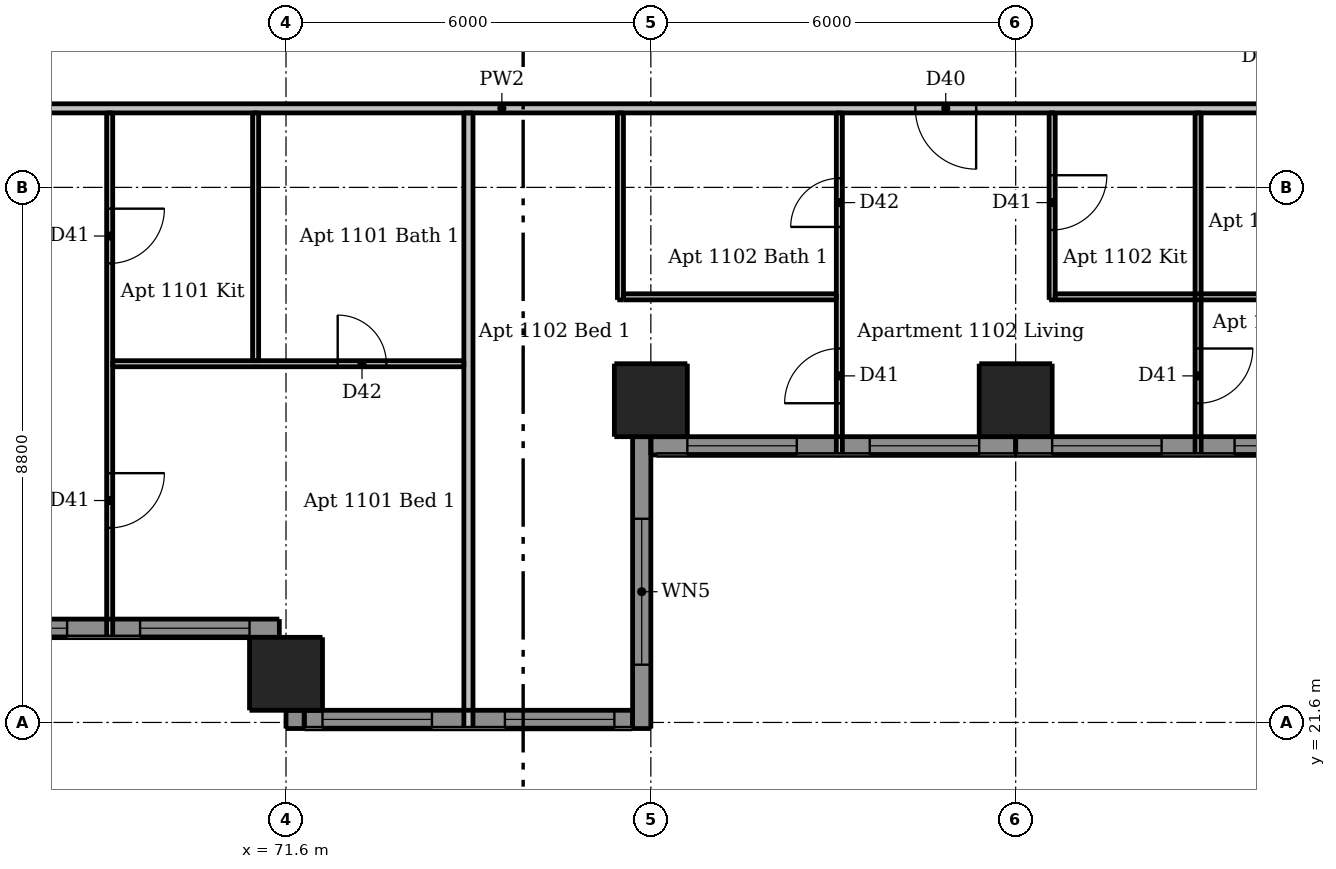
"""IFC4 building model, lengths in metres.
Left out: names, types, materials, properties, quantities, classifications, styles, units other than length and angle.
Written with IfcOpenShell. Run it as: python <this file> out.ifc"""

import sys

from ifc_helpers import new_model, si_unit, direction, frame, frame_2d, origin, origin_2d, place, context, subcontext, project, spatial, rectangle, extrude, element, fill, save


model = new_model("IFC4")
c1 = context("Model", 3, precision=1e-05, world=origin(), true_north=direction((0.0, 1.0)))
c2 = subcontext(c1, "Body", "Model", "MODEL_VIEW")
j1 = project(units=[si_unit("LENGTHUNIT", "METRE"), si_unit("PLANEANGLEUNIT", "RADIAN")], contexts=[c1])
p1 = place(None, origin())
s1 = spatial("IfcSite", under=j1, at=p1, CompositionType="ELEMENT")
p2 = place(p1, origin())
s2 = spatial("IfcBuilding", under=s1, at=p2, CompositionType="ELEMENT")
p3 = place(p2, frame((0.0, 0.0, 43.3)))
s3 = spatial("IfcBuildingStorey", under=s2, at=p3, CompositionType="ELEMENT", Elevation=43.3)
for number, where, z_axis, x_axis in (
    (1, (71.6, 22.4, 0.0), (0.0, 0.0, 1.0), (1.0, 0.0, 0.0)),
    (2, (77.6, 26.9, 0.0), (0.0, 0.0, 1.0), (1.0, 0.0, 0.0)),
    (3, (83.6, 26.9, 0.0), (0.0, 0.0, 1.0), (1.0, 0.0, 0.0)),
):
    element("IfcColumn", number, at=place(p3, frame(where, z_axis=z_axis, x_axis=x_axis)), inside=s3, PredefinedType="COLUMN", context=c2, shape_type="SweptSolid", body=[
        extrude(rectangle(XDim=1.2, YDim=1.2, at=origin_2d()), origin(), (0.0, 0.0, 1.0), 3.05),
    ])
p4 = place(p3, frame((71.75, 21.8, 0.0), z_axis=(0.0, 0.0, 1.0), x_axis=(0.0, -1.0, 0.0)))
e4 = element("IfcWall", 4, at=p4, inside=s3, PredefinedType="SOLIDWALL", context=c2, shape_type="SweptSolid", body=[
    extrude(rectangle(XDim=0.3, YDim=0.3, at=frame_2d((0.15, 0.0))), origin(), (0.0, 0.0, 1.0), 3.05),
])
p5 = place(p3, frame((77.45, 21.5, 0.0), z_axis=(0.0, 0.0, 1.0), x_axis=(0.0, 1.0, 0.0)))
e5 = element("IfcWall", 5, at=p5, inside=s3, PredefinedType="SOLIDWALL", context=c2, shape_type="SweptSolid", body=[
    extrude(rectangle(XDim=4.8, YDim=0.3, at=frame_2d((2.4, 0.0))), origin(), (0.0, 0.0, 1.0), 3.05),
])
p6 = place(p5, frame((1.05, 0.0, 0.15)))
e6 = element("IfcOpeningElement", 6, at=p6, cuts=e5, PredefinedType="OPENING", context=c2, shape_type="SweptSolid", body=[
    extrude(rectangle(XDim=2.4, YDim=2.1, at=frame_2d((1.2, 1.05))), frame((0.0, 0.16, 0.0), z_axis=(0.0, -1.0, 0.0), x_axis=(1.0, 0.0, 0.0)), (0.0, 0.0, 1.0), 0.32),
])
p7 = place(p3, frame((65.71, 23.15, 0.0), z_axis=(0.0, 0.0, 1.0), x_axis=(1.0, 0.0, 0.0)))
e7 = element("IfcWall", 7, at=p7, inside=s3, PredefinedType="SOLIDWALL", context=c2, shape_type="SweptSolid", body=[
    extrude(rectangle(XDim=5.78, YDim=0.3, at=frame_2d((2.89, 0.0))), origin(), (0.0, 0.0, 1.0), 3.05),
])
p8 = place(p7, frame((0.49, 0.0, 0.15)))
e8 = element("IfcOpeningElement", 8, at=p8, cuts=e7, PredefinedType="OPENING", context=c2, shape_type="SweptSolid", body=[
    extrude(rectangle(XDim=1.8, YDim=2.1, at=frame_2d((0.9, 1.05))), frame((0.0, 0.16, 0.0), z_axis=(0.0, -1.0, 0.0), x_axis=(1.0, 0.0, 0.0)), (0.0, 0.0, 1.0), 0.32),
])
p9 = place(p7, frame((3.49, 0.0, 0.15)))
e9 = element("IfcOpeningElement", 9, at=p9, cuts=e7, PredefinedType="OPENING", context=c2, shape_type="SweptSolid", body=[
    extrude(rectangle(XDim=1.8, YDim=2.1, at=frame_2d((0.9, 1.05))), frame((0.0, 0.16, 0.0), z_axis=(0.0, -1.0, 0.0), x_axis=(1.0, 0.0, 0.0)), (0.0, 0.0, 1.0), 0.32),
])
p10 = place(p3, frame((71.9, 21.65, 0.0), z_axis=(0.0, 0.0, 1.0), x_axis=(1.0, 0.0, 0.0)))
e10 = element("IfcWall", 10, at=p10, inside=s3, PredefinedType="SOLIDWALL", context=c2, shape_type="SweptSolid", body=[
    extrude(rectangle(XDim=5.4, YDim=0.3, at=frame_2d((2.7, 0.0))), origin(), (0.0, 0.0, 1.0), 3.05),
])
p11 = place(p10, frame((0.3, 0.0, 0.15)))
e11 = element("IfcOpeningElement", 11, at=p11, cuts=e10, PredefinedType="OPENING", context=c2, shape_type="SweptSolid", body=[
    extrude(rectangle(XDim=1.8, YDim=2.1, at=frame_2d((0.9, 1.05))), frame((0.0, 0.16, 0.0), z_axis=(0.0, -1.0, 0.0), x_axis=(1.0, 0.0, 0.0)), (0.0, 0.0, 1.0), 0.32),
])
p12 = place(p10, frame((3.3, 0.0, 0.15)))
e12 = element("IfcOpeningElement", 12, at=p12, cuts=e10, PredefinedType="OPENING", context=c2, shape_type="SweptSolid", body=[
    extrude(rectangle(XDim=1.8, YDim=2.1, at=frame_2d((0.9, 1.05))), frame((0.0, 0.16, 0.0), z_axis=(0.0, -1.0, 0.0), x_axis=(1.0, 0.0, 0.0)), (0.0, 0.0, 1.0), 0.32),
])
p13 = place(p3, frame((77.6, 26.15, 0.0), z_axis=(0.0, 0.0, 1.0), x_axis=(1.0, 0.0, 0.0)))
e13 = element("IfcWall", 13, at=p13, inside=s3, PredefinedType="SOLIDWALL", context=c2, shape_type="SweptSolid", body=[
    extrude(rectangle(XDim=6.0, YDim=0.3, at=frame_2d((3.0, 0.0))), origin(), (0.0, 0.0, 1.0), 3.05),
])
p14 = place(p13, frame((0.6, 0.0, 0.15)))
e14 = element("IfcOpeningElement", 14, at=p14, cuts=e13, PredefinedType="OPENING", context=c2, shape_type="SweptSolid", body=[
    extrude(rectangle(XDim=1.8, YDim=2.1, at=frame_2d((0.9, 1.05))), frame((0.0, 0.16, 0.0), z_axis=(0.0, -1.0, 0.0), x_axis=(1.0, 0.0, 0.0)), (0.0, 0.0, 1.0), 0.32),
])
p15 = place(p13, frame((3.6, 0.0, 0.15)))
e15 = element("IfcOpeningElement", 15, at=p15, cuts=e13, PredefinedType="OPENING", context=c2, shape_type="SweptSolid", body=[
    extrude(rectangle(XDim=1.8, YDim=2.1, at=frame_2d((0.9, 1.05))), frame((0.0, 0.16, 0.0), z_axis=(0.0, -1.0, 0.0), x_axis=(1.0, 0.0, 0.0)), (0.0, 0.0, 1.0), 0.32),
])
p16 = place(p3, frame((83.6, 26.15, 0.0), z_axis=(0.0, 0.0, 1.0), x_axis=(1.0, 0.0, 0.0)))
e16 = element("IfcWall", 16, at=p16, inside=s3, PredefinedType="SOLIDWALL", context=c2, shape_type="SweptSolid", body=[
    extrude(rectangle(XDim=5.89, YDim=0.3, at=frame_2d((2.945, 0.0))), origin(), (0.0, 0.0, 1.0), 3.05),
])
p17 = place(p16, frame((0.6, 0.0, 0.15)))
e17 = element("IfcOpeningElement", 17, at=p17, cuts=e16, PredefinedType="OPENING", context=c2, shape_type="SweptSolid", body=[
    extrude(rectangle(XDim=1.8, YDim=2.1, at=frame_2d((0.9, 1.05))), frame((0.0, 0.16, 0.0), z_axis=(0.0, -1.0, 0.0), x_axis=(1.0, 0.0, 0.0)), (0.0, 0.0, 1.0), 0.32),
])
p18 = place(p16, frame((3.6, 0.0, 0.15)))
e18 = element("IfcOpeningElement", 18, at=p18, cuts=e16, PredefinedType="OPENING", context=c2, shape_type="SweptSolid", body=[
    extrude(rectangle(XDim=1.8, YDim=2.1, at=frame_2d((0.9, 1.05))), frame((0.0, 0.16, 0.0), z_axis=(0.0, -1.0, 0.0), x_axis=(1.0, 0.0, 0.0)), (0.0, 0.0, 1.0), 0.32),
])
p19 = place(p3, frame((68.7, 31.625, 0.0), z_axis=(0.0, 0.0, 1.0), x_axis=(0.0, -1.0, 0.0)))
e19 = element("IfcWall", 19, at=p19, inside=s3, PredefinedType="PARTITIONING", context=c2, shape_type="SweptSolid", body=[
    extrude(rectangle(XDim=8.625, YDim=0.1, at=frame_2d((4.312, 0.0))), origin(), (0.0, 0.0, 1.0), 3.05),
])
p20 = place(p19, frame((1.575, 0.0, 0.0)))
e20 = element("IfcOpeningElement", 20, at=p20, cuts=e19, PredefinedType="OPENING", context=c2, shape_type="SweptSolid", body=[
    extrude(rectangle(XDim=0.9, YDim=2.1, at=frame_2d((0.45, 1.05))), frame((0.0, 0.06, 0.0), z_axis=(0.0, -1.0, 0.0), x_axis=(1.0, 0.0, 0.0)), (0.0, 0.0, 1.0), 0.12),
])
p21 = place(p19, frame((5.925, 0.0, 0.0)))
e21 = element("IfcOpeningElement", 21, at=p21, cuts=e19, PredefinedType="OPENING", context=c2, shape_type="SweptSolid", body=[
    extrude(rectangle(XDim=0.9, YDim=2.1, at=frame_2d((0.45, 1.05))), frame((0.0, 0.06, 0.0), z_axis=(0.0, -1.0, 0.0), x_axis=(1.0, 0.0, 0.0)), (0.0, 0.0, 1.0), 0.12),
])
p22 = place(p3, frame((71.1, 27.55, 0.0), z_axis=(0.0, 0.0, 1.0), x_axis=(0.0, 1.0, 0.0)))
e22 = element("IfcWall", 22, at=p22, inside=s3, PredefinedType="PARTITIONING", context=c2, shape_type="SweptSolid", body=[
    extrude(rectangle(XDim=4.075, YDim=0.1, at=frame_2d((2.038, 0.0))), origin(), (0.0, 0.0, 1.0), 3.05),
])
p23 = place(p3, frame((77.1, 28.55, 0.0), z_axis=(0.0, 0.0, 1.0), x_axis=(0.0, 1.0, 0.0)))
e23 = element("IfcWall", 23, at=p23, inside=s3, PredefinedType="PARTITIONING", context=c2, shape_type="SweptSolid", body=[
    extrude(rectangle(XDim=3.075, YDim=0.1, at=frame_2d((1.538, 0.0))), origin(), (0.0, 0.0, 1.0), 3.05),
])
p24 = place(p3, frame((80.7, 26.0, 0.0), z_axis=(0.0, 0.0, 1.0), x_axis=(0.0, 1.0, 0.0)))
e24 = element("IfcWall", 24, at=p24, inside=s3, PredefinedType="PARTITIONING", context=c2, shape_type="SweptSolid", body=[
    extrude(rectangle(XDim=5.625, YDim=0.1, at=frame_2d((2.812, 0.0))), origin(), (0.0, 0.0, 1.0), 3.05),
])
p25 = place(p24, frame((0.85, 0.0, 0.0)))
e25 = element("IfcOpeningElement", 25, at=p25, cuts=e24, PredefinedType="OPENING", context=c2, shape_type="SweptSolid", body=[
    extrude(rectangle(XDim=0.9, YDim=2.1, at=frame_2d((0.45, 1.05))), frame((0.0, 0.06, 0.0), z_axis=(0.0, -1.0, 0.0), x_axis=(1.0, 0.0, 0.0)), (0.0, 0.0, 1.0), 0.12),
])
p26 = place(p24, frame((3.75, 0.0, 0.0)))
e26 = element("IfcOpeningElement", 26, at=p26, cuts=e24, PredefinedType="OPENING", context=c2, shape_type="SweptSolid", body=[
    extrude(rectangle(XDim=0.8, YDim=2.1, at=frame_2d((0.4, 1.05))), frame((0.0, 0.06, 0.0), z_axis=(0.0, -1.0, 0.0), x_axis=(1.0, 0.0, 0.0)), (0.0, 0.0, 1.0), 0.12),
])
p27 = place(p3, frame((84.2, 31.625, 0.0), z_axis=(0.0, 0.0, 1.0), x_axis=(0.0, -1.0, 0.0)))
e27 = element("IfcWall", 27, at=p27, inside=s3, PredefinedType="PARTITIONING", context=c2, shape_type="SweptSolid", body=[
    extrude(rectangle(XDim=3.075, YDim=0.1, at=frame_2d((1.538, 0.0))), origin(), (0.0, 0.0, 1.0), 3.05),
])
p28 = place(p27, frame((1.025, 0.0, 0.0)))
e28 = element("IfcOpeningElement", 28, at=p28, cuts=e27, PredefinedType="OPENING", context=c2, shape_type="SweptSolid", body=[
    extrude(rectangle(XDim=0.9, YDim=2.1, at=frame_2d((0.45, 1.05))), frame((0.0, 0.06, 0.0), z_axis=(0.0, -1.0, 0.0), x_axis=(1.0, 0.0, 0.0)), (0.0, 0.0, 1.0), 0.12),
])
p29 = place(p3, frame((86.6, 31.625, 0.0), z_axis=(0.0, 0.0, 1.0), x_axis=(0.0, -1.0, 0.0)))
e29 = element("IfcWall", 29, at=p29, inside=s3, PredefinedType="PARTITIONING", context=c2, shape_type="SweptSolid", body=[
    extrude(rectangle(XDim=5.625, YDim=0.1, at=frame_2d((2.812, 0.0))), origin(), (0.0, 0.0, 1.0), 3.05),
])
p30 = place(p29, frame((3.875, 0.0, 0.0)))
e30 = element("IfcOpeningElement", 30, at=p30, cuts=e29, PredefinedType="OPENING", context=c2, shape_type="SweptSolid", body=[
    extrude(rectangle(XDim=0.9, YDim=2.1, at=frame_2d((0.45, 1.05))), frame((0.0, 0.06, 0.0), z_axis=(0.0, -1.0, 0.0), x_axis=(1.0, 0.0, 0.0)), (0.0, 0.0, 1.0), 0.12),
])
p31 = place(p3, frame((77.15, 28.6, 0.0), z_axis=(0.0, 0.0, 1.0), x_axis=(1.0, 0.0, 0.0)))
e31 = element("IfcWall", 31, at=p31, inside=s3, PredefinedType="PARTITIONING", context=c2, shape_type="SweptSolid", body=[
    extrude(rectangle(XDim=3.5, YDim=0.1, at=frame_2d((1.75, 0.0))), origin(), (0.0, 0.0, 1.0), 3.05),
])
p32 = place(p3, frame((84.25, 28.6, 0.0), z_axis=(0.0, 0.0, 1.0), x_axis=(1.0, 0.0, 0.0)))
e32 = element("IfcWall", 32, at=p32, inside=s3, PredefinedType="PARTITIONING", context=c2, shape_type="SweptSolid", body=[
    extrude(rectangle(XDim=5.275, YDim=0.1, at=frame_2d((2.637, 0.0))), origin(), (0.0, 0.0, 1.0), 3.05),
])
p33 = place(p32, frame((3.45, 0.0, 0.0)))
e33 = element("IfcOpeningElement", 33, at=p33, cuts=e32, PredefinedType="OPENING", context=c2, shape_type="SweptSolid", body=[
    extrude(rectangle(XDim=0.8, YDim=2.1, at=frame_2d((0.4, 1.05))), frame((0.0, 0.06, 0.0), z_axis=(0.0, -1.0, 0.0), x_axis=(1.0, 0.0, 0.0)), (0.0, 0.0, 1.0), 0.12),
])
p34 = place(p3, frame((68.75, 27.5, 0.0), z_axis=(0.0, 0.0, 1.0), x_axis=(1.0, 0.0, 0.0)))
e34 = element("IfcWall", 34, at=p34, inside=s3, PredefinedType="PARTITIONING", context=c2, shape_type="SweptSolid", body=[
    extrude(rectangle(XDim=5.775, YDim=0.1, at=frame_2d((2.887, 0.0))), origin(), (0.0, 0.0, 1.0), 3.05),
])
p35 = place(p34, frame((3.7, 0.0, 0.0)))
e35 = element("IfcOpeningElement", 35, at=p35, cuts=e34, PredefinedType="OPENING", context=c2, shape_type="SweptSolid", body=[
    extrude(rectangle(XDim=0.8, YDim=2.1, at=frame_2d((0.4, 1.05))), frame((0.0, 0.06, 0.0), z_axis=(0.0, -1.0, 0.0), x_axis=(1.0, 0.0, 0.0)), (0.0, 0.0, 1.0), 0.12),
])
p36 = place(p3, frame((74.6, 21.5, 0.0), z_axis=(0.0, 0.0, 1.0), x_axis=(0.0, 1.0, 0.0)))
e36 = element("IfcWall", 36, at=p36, inside=s3, PredefinedType="PARTITIONING", context=c2, shape_type="SweptSolid", body=[
    extrude(rectangle(XDim=10.125, YDim=0.15, at=frame_2d((5.062, 0.0))), origin(), (0.0, 0.0, 1.0), 3.05),
])
p37 = place(p3, frame((89.525, 31.7, 0.0), z_axis=(0.0, 0.0, 1.0), x_axis=(-1.0, 0.0, 0.0)))
e37 = element("IfcWall", 37, at=p37, inside=s3, PredefinedType="PARTITIONING", context=c2, shape_type="SweptSolid", body=[
    extrude(rectangle(XDim=28.75, YDim=0.15, at=frame_2d((14.375, 0.0))), origin(), (0.0, 0.0, 1.0), 3.05),
])
p38 = place(p37, frame((24.325, 0.0, 0.0)))
e38 = element("IfcOpeningElement", 38, at=p38, cuts=e37, PredefinedType="OPENING", context=c2, shape_type="SweptSolid", body=[
    extrude(rectangle(XDim=1.0, YDim=2.1, at=frame_2d((0.5, 1.05))), frame((0.0, 0.085, 0.0), z_axis=(0.0, -1.0, 0.0), x_axis=(1.0, 0.0, 0.0)), (0.0, 0.0, 1.0), 0.17),
])
p39 = place(p37, frame((6.575, 0.0, 0.0)))
e39 = element("IfcOpeningElement", 39, at=p39, cuts=e37, PredefinedType="OPENING", context=c2, shape_type="SweptSolid", body=[
    extrude(rectangle(XDim=1.0, YDim=2.1, at=frame_2d((0.5, 1.05))), frame((0.0, 0.085, 0.0), z_axis=(0.0, -1.0, 0.0), x_axis=(1.0, 0.0, 0.0)), (0.0, 0.0, 1.0), 0.17),
])
p40 = place(p6, origin())
e40 = element("IfcWindow", 40, at=p40, inside=s3, PartitioningType="DOUBLE_PANEL_VERTICAL", PredefinedType="WINDOW", context=c2, shape_type="SweptSolid", body=[
    extrude(rectangle(XDim=2.4, YDim=2.1, at=frame_2d((1.2, 1.05))), frame((0.0, 0.03, 0.0), z_axis=(0.0, -1.0, 0.0), x_axis=(1.0, 0.0, 0.0)), (0.0, 0.0, 1.0), 0.06),
])
fill(e6, e40)
p41 = place(p8, origin())
e41 = element("IfcWindow", 41, at=p41, inside=s3, PartitioningType="DOUBLE_PANEL_VERTICAL", PredefinedType="WINDOW", context=c2, shape_type="SweptSolid", body=[
    extrude(rectangle(XDim=1.8, YDim=2.1, at=frame_2d((0.9, 1.05))), frame((0.0, 0.03, 0.0), z_axis=(0.0, -1.0, 0.0), x_axis=(1.0, 0.0, 0.0)), (0.0, 0.0, 1.0), 0.06),
])
fill(e8, e41)
p42 = place(p9, origin())
e42 = element("IfcWindow", 42, at=p42, inside=s3, PartitioningType="DOUBLE_PANEL_VERTICAL", PredefinedType="WINDOW", context=c2, shape_type="SweptSolid", body=[
    extrude(rectangle(XDim=1.8, YDim=2.1, at=frame_2d((0.9, 1.05))), frame((0.0, 0.03, 0.0), z_axis=(0.0, -1.0, 0.0), x_axis=(1.0, 0.0, 0.0)), (0.0, 0.0, 1.0), 0.06),
])
fill(e9, e42)
p43 = place(p11, origin())
e43 = element("IfcWindow", 43, at=p43, inside=s3, PartitioningType="DOUBLE_PANEL_VERTICAL", PredefinedType="WINDOW", context=c2, shape_type="SweptSolid", body=[
    extrude(rectangle(XDim=1.8, YDim=2.1, at=frame_2d((0.9, 1.05))), frame((0.0, 0.03, 0.0), z_axis=(0.0, -1.0, 0.0), x_axis=(1.0, 0.0, 0.0)), (0.0, 0.0, 1.0), 0.06),
])
fill(e11, e43)
p44 = place(p12, origin())
e44 = element("IfcWindow", 44, at=p44, inside=s3, PartitioningType="DOUBLE_PANEL_VERTICAL", PredefinedType="WINDOW", context=c2, shape_type="SweptSolid", body=[
    extrude(rectangle(XDim=1.8, YDim=2.1, at=frame_2d((0.9, 1.05))), frame((0.0, 0.03, 0.0), z_axis=(0.0, -1.0, 0.0), x_axis=(1.0, 0.0, 0.0)), (0.0, 0.0, 1.0), 0.06),
])
fill(e12, e44)
p45 = place(p14, origin())
e45 = element("IfcWindow", 45, at=p45, inside=s3, PartitioningType="DOUBLE_PANEL_VERTICAL", PredefinedType="WINDOW", context=c2, shape_type="SweptSolid", body=[
    extrude(rectangle(XDim=1.8, YDim=2.1, at=frame_2d((0.9, 1.05))), frame((0.0, 0.03, 0.0), z_axis=(0.0, -1.0, 0.0), x_axis=(1.0, 0.0, 0.0)), (0.0, 0.0, 1.0), 0.06),
])
fill(e14, e45)
p46 = place(p15, origin())
e46 = element("IfcWindow", 46, at=p46, inside=s3, PartitioningType="DOUBLE_PANEL_VERTICAL", PredefinedType="WINDOW", context=c2, shape_type="SweptSolid", body=[
    extrude(rectangle(XDim=1.8, YDim=2.1, at=frame_2d((0.9, 1.05))), frame((0.0, 0.03, 0.0), z_axis=(0.0, -1.0, 0.0), x_axis=(1.0, 0.0, 0.0)), (0.0, 0.0, 1.0), 0.06),
])
fill(e15, e46)
p47 = place(p17, origin())
e47 = element("IfcWindow", 47, at=p47, inside=s3, PartitioningType="DOUBLE_PANEL_VERTICAL", PredefinedType="WINDOW", context=c2, shape_type="SweptSolid", body=[
    extrude(rectangle(XDim=1.8, YDim=2.1, at=frame_2d((0.9, 1.05))), frame((0.0, 0.03, 0.0), z_axis=(0.0, -1.0, 0.0), x_axis=(1.0, 0.0, 0.0)), (0.0, 0.0, 1.0), 0.06),
])
fill(e17, e47)
p48 = place(p18, origin())
e48 = element("IfcWindow", 48, at=p48, inside=s3, PartitioningType="DOUBLE_PANEL_VERTICAL", PredefinedType="WINDOW", context=c2, shape_type="SweptSolid", body=[
    extrude(rectangle(XDim=1.8, YDim=2.1, at=frame_2d((0.9, 1.05))), frame((0.0, 0.03, 0.0), z_axis=(0.0, -1.0, 0.0), x_axis=(1.0, 0.0, 0.0)), (0.0, 0.0, 1.0), 0.06),
])
fill(e18, e48)
p49 = place(p20, origin())
e49 = element("IfcDoor", 49, at=p49, inside=s3, OperationType="SINGLE_SWING_LEFT", PredefinedType="DOOR", context=c2, shape_type="SweptSolid", body=[
    extrude(rectangle(XDim=0.9, YDim=2.1, at=frame_2d((0.45, 1.05))), frame((0.0, 0.025, 0.0), z_axis=(0.0, -1.0, 0.0), x_axis=(1.0, 0.0, 0.0)), (0.0, 0.0, 1.0), 0.05),
])
fill(e20, e49)
p50 = place(p21, origin())
e50 = element("IfcDoor", 50, at=p50, inside=s3, OperationType="SINGLE_SWING_LEFT", PredefinedType="DOOR", context=c2, shape_type="SweptSolid", body=[
    extrude(rectangle(XDim=0.9, YDim=2.1, at=frame_2d((0.45, 1.05))), frame((0.0, 0.025, 0.0), z_axis=(0.0, -1.0, 0.0), x_axis=(1.0, 0.0, 0.0)), (0.0, 0.0, 1.0), 0.05),
])
fill(e21, e50)
p51 = place(p35, origin())
e51 = element("IfcDoor", 51, at=p51, inside=s3, OperationType="SINGLE_SWING_LEFT", PredefinedType="DOOR", context=c2, shape_type="SweptSolid", body=[
    extrude(rectangle(XDim=0.8, YDim=2.1, at=frame_2d((0.4, 1.05))), frame((0.0, 0.025, 0.0), z_axis=(0.0, -1.0, 0.0), x_axis=(1.0, 0.0, 0.0)), (0.0, 0.0, 1.0), 0.05),
])
fill(e35, e51)
p52 = place(p39, origin())
e52 = element("IfcDoor", 52, at=p52, inside=s3, OperationType="SINGLE_SWING_LEFT", PredefinedType="DOOR", context=c2, shape_type="SweptSolid", body=[
    extrude(rectangle(XDim=1.0, YDim=2.1, at=frame_2d((0.5, 1.05))), frame((0.0, 0.025, 0.0), z_axis=(0.0, -1.0, 0.0), x_axis=(1.0, 0.0, 0.0)), (0.0, 0.0, 1.0), 0.05),
])
fill(e39, e52)
p53 = place(p28, origin())
e53 = element("IfcDoor", 53, at=p53, inside=s3, OperationType="SINGLE_SWING_LEFT", PredefinedType="DOOR", context=c2, shape_type="SweptSolid", body=[
    extrude(rectangle(XDim=0.9, YDim=2.1, at=frame_2d((0.45, 1.05))), frame((0.0, 0.025, 0.0), z_axis=(0.0, -1.0, 0.0), x_axis=(1.0, 0.0, 0.0)), (0.0, 0.0, 1.0), 0.05),
])
fill(e28, e53)
p54 = place(p25, origin())
e54 = element("IfcDoor", 54, at=p54, inside=s3, OperationType="SINGLE_SWING_LEFT", PredefinedType="DOOR", context=c2, shape_type="SweptSolid", body=[
    extrude(rectangle(XDim=0.9, YDim=2.1, at=frame_2d((0.45, 1.05))), frame((0.0, 0.025, 0.0), z_axis=(0.0, -1.0, 0.0), x_axis=(1.0, 0.0, 0.0)), (0.0, 0.0, 1.0), 0.05),
])
fill(e25, e54)
p55 = place(p26, origin())
e55 = element("IfcDoor", 55, at=p55, inside=s3, OperationType="SINGLE_SWING_LEFT", PredefinedType="DOOR", context=c2, shape_type="SweptSolid", body=[
    extrude(rectangle(XDim=0.8, YDim=2.1, at=frame_2d((0.4, 1.05))), frame((0.0, 0.025, 0.0), z_axis=(0.0, -1.0, 0.0), x_axis=(1.0, 0.0, 0.0)), (0.0, 0.0, 1.0), 0.05),
])
fill(e26, e55)
p56 = place(p30, origin())
e56 = element("IfcDoor", 56, at=p56, inside=s3, OperationType="SINGLE_SWING_LEFT", PredefinedType="DOOR", context=c2, shape_type="SweptSolid", body=[
    extrude(rectangle(XDim=0.9, YDim=2.1, at=frame_2d((0.45, 1.05))), frame((0.0, 0.025, 0.0), z_axis=(0.0, -1.0, 0.0), x_axis=(1.0, 0.0, 0.0)), (0.0, 0.0, 1.0), 0.05),
])
fill(e30, e56)
save(model, sys.argv[1])
